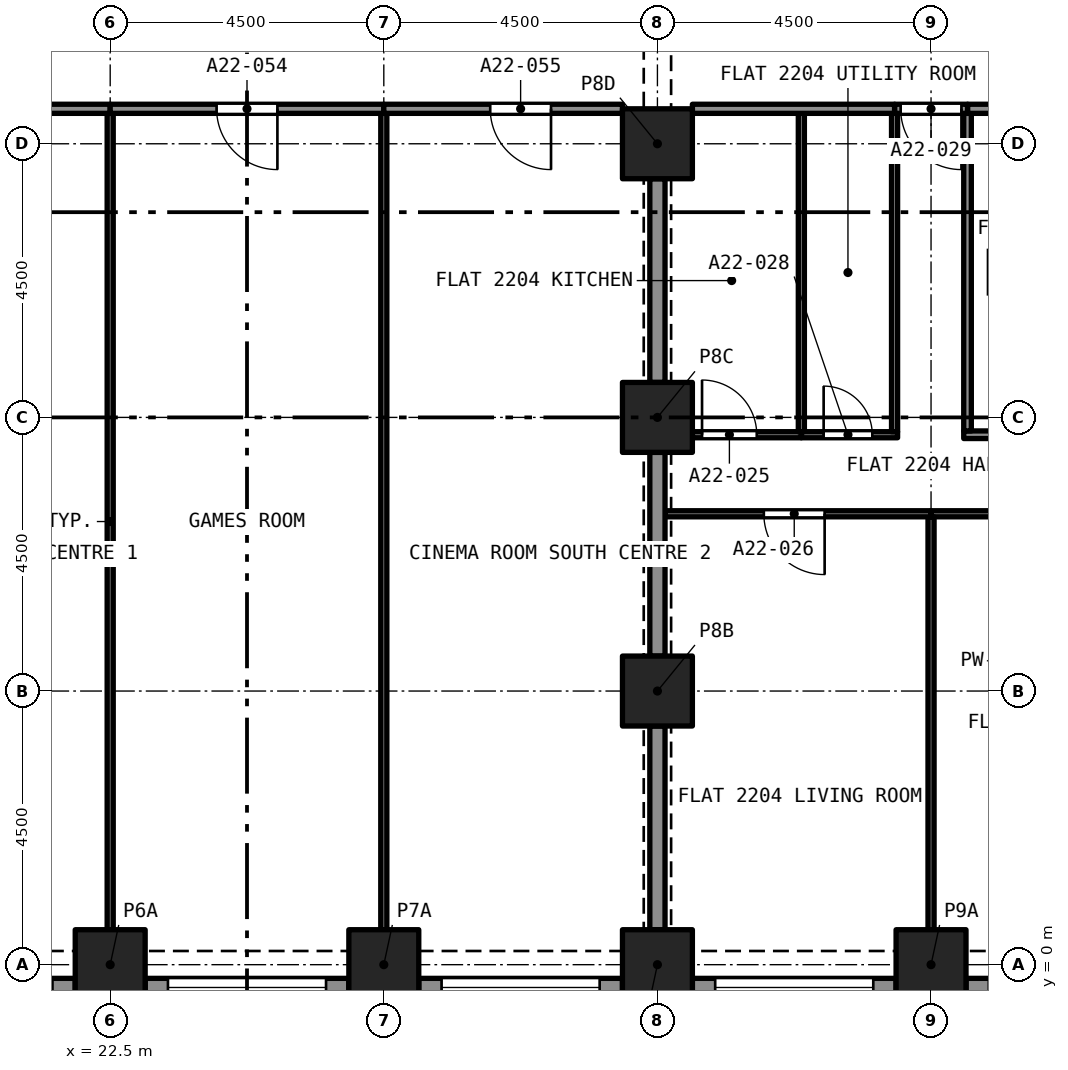
"""IFC4 building model, lengths in metres.
Left out: names, types, materials, properties, quantities, classifications, styles, units other than length and angle.
Written with IfcOpenShell. Run it as: python <this file> out.ifc"""

import sys

from ifc_helpers import new_model, si_unit, direction, frame, frame_2d, origin, origin_2d, place, context, subcontext, project, spatial, rectangle, extrude, element, fill, save


model = new_model("IFC4")
c1 = context("Model", 3, precision=1e-05, world=origin(), true_north=direction((0.0, 1.0)))
c2 = subcontext(c1, "Body", "Model", "MODEL_VIEW")
j1 = project(units=[si_unit("LENGTHUNIT", "METRE"), si_unit("PLANEANGLEUNIT", "RADIAN")], contexts=[c1])
p1 = place(None, origin())
s1 = spatial("IfcSite", under=j1, at=p1, CompositionType="ELEMENT")
p2 = place(p1, origin())
s2 = spatial("IfcBuilding", under=s1, at=p2, CompositionType="ELEMENT")
p3 = place(p2, frame((0.0, 0.0, 83.2)))
s3 = spatial("IfcBuildingStorey", under=s2, at=p3, CompositionType="ELEMENT", Elevation=83.2)
for number, where, z_axis, x_axis in (
    (1, (22.5, 0.0, 0.0), (0.0, 0.0, 1.0), (1.0, 0.0, 0.0)),
    (2, (27.0, 0.0, 0.0), (0.0, 0.0, 1.0), (1.0, 0.0, 0.0)),
    (3, (31.5, 0.0, 0.0), (0.0, 0.0, 1.0), (1.0, 0.0, 0.0)),
    (4, (36.0, 0.0, 0.0), (0.0, 0.0, 1.0), (1.0, 0.0, 0.0)),
    (5, (31.5, 4.5, 0.0), (0.0, 0.0, 1.0), (1.0, 0.0, 0.0)),
    (6, (31.5, 9.0, 0.0), (0.0, 0.0, 1.0), (1.0, 0.0, 0.0)),
    (7, (31.5, 13.5, 0.0), (0.0, 0.0, 1.0), (1.0, 0.0, 0.0)),
):
    element("IfcColumn", number, at=place(p3, frame(where, z_axis=z_axis, x_axis=x_axis)), inside=s3, PredefinedType="COLUMN", context=c2, shape_type="SweptSolid", body=[
        extrude(rectangle(XDim=1.15, YDim=1.15, at=origin_2d()), origin(), (0.0, 0.0, 1.0), 3.2),
    ])
p4 = place(p3, frame((21.925, -0.375, 0.0), z_axis=(0.0, 0.0, 1.0), x_axis=(-1.0, 0.0, 0.0)))
e8 = element("IfcWall", 8, at=p4, inside=s3, PredefinedType="SOLIDWALL", context=c2, shape_type="SweptSolid", body=[
    extrude(rectangle(XDim=3.35, YDim=0.3, at=frame_2d((1.675, 0.0))), origin(), (0.0, 0.0, 1.0), 3.2),
])
p5 = place(p4, frame((0.375, 0.0, 0.45)))
e9 = element("IfcOpeningElement", 9, at=p5, cuts=e8, PredefinedType="OPENING", context=c2, shape_type="SweptSolid", body=[
    extrude(rectangle(XDim=2.6, YDim=1.95, at=frame_2d((1.3, 0.975))), frame((0.0, 0.16, 0.0), z_axis=(0.0, -1.0, 0.0), x_axis=(1.0, 0.0, 0.0)), (0.0, 0.0, 1.0), 0.32),
])
p6 = place(p3, frame((26.425, -0.375, 0.0), z_axis=(0.0, 0.0, 1.0), x_axis=(-1.0, 0.0, 0.0)))
e10 = element("IfcWall", 10, at=p6, inside=s3, PredefinedType="SOLIDWALL", context=c2, shape_type="SweptSolid", body=[
    extrude(rectangle(XDim=3.35, YDim=0.3, at=frame_2d((1.675, 0.0))), origin(), (0.0, 0.0, 1.0), 3.2),
])
p7 = place(p6, frame((0.375, 0.0, 0.45)))
e11 = element("IfcOpeningElement", 11, at=p7, cuts=e10, PredefinedType="OPENING", context=c2, shape_type="SweptSolid", body=[
    extrude(rectangle(XDim=2.6, YDim=1.95, at=frame_2d((1.3, 0.975))), frame((0.0, 0.16, 0.0), z_axis=(0.0, -1.0, 0.0), x_axis=(1.0, 0.0, 0.0)), (0.0, 0.0, 1.0), 0.32),
])
p8 = place(p3, frame((30.925, -0.375, 0.0), z_axis=(0.0, 0.0, 1.0), x_axis=(-1.0, 0.0, 0.0)))
e12 = element("IfcWall", 12, at=p8, inside=s3, PredefinedType="SOLIDWALL", context=c2, shape_type="SweptSolid", body=[
    extrude(rectangle(XDim=3.35, YDim=0.3, at=frame_2d((1.675, 0.0))), origin(), (0.0, 0.0, 1.0), 3.2),
])
p9 = place(p8, frame((0.375, 0.0, 0.45)))
e13 = element("IfcOpeningElement", 13, at=p9, cuts=e12, PredefinedType="OPENING", context=c2, shape_type="SweptSolid", body=[
    extrude(rectangle(XDim=2.6, YDim=1.95, at=frame_2d((1.3, 0.975))), frame((0.0, 0.16, 0.0), z_axis=(0.0, -1.0, 0.0), x_axis=(1.0, 0.0, 0.0)), (0.0, 0.0, 1.0), 0.32),
])
p10 = place(p3, frame((35.425, -0.375, 0.0), z_axis=(0.0, 0.0, 1.0), x_axis=(-1.0, 0.0, 0.0)))
e14 = element("IfcWall", 14, at=p10, inside=s3, PredefinedType="SOLIDWALL", context=c2, shape_type="SweptSolid", body=[
    extrude(rectangle(XDim=3.35, YDim=0.3, at=frame_2d((1.675, 0.0))), origin(), (0.0, 0.0, 1.0), 3.2),
])
p11 = place(p10, frame((0.375, 0.0, 0.45)))
e15 = element("IfcOpeningElement", 15, at=p11, cuts=e14, PredefinedType="OPENING", context=c2, shape_type="SweptSolid", body=[
    extrude(rectangle(XDim=2.6, YDim=1.95, at=frame_2d((1.3, 0.975))), frame((0.0, 0.16, 0.0), z_axis=(0.0, -1.0, 0.0), x_axis=(1.0, 0.0, 0.0)), (0.0, 0.0, 1.0), 0.32),
])
p12 = place(p3, frame((39.925, -0.375, 0.0), z_axis=(0.0, 0.0, 1.0), x_axis=(-1.0, 0.0, 0.0)))
e16 = element("IfcWall", 16, at=p12, inside=s3, PredefinedType="SOLIDWALL", context=c2, shape_type="SweptSolid", body=[
    extrude(rectangle(XDim=3.35, YDim=0.3, at=frame_2d((1.675, 0.0))), origin(), (0.0, 0.0, 1.0), 3.2),
])
p13 = place(p12, frame((0.375, 0.0, 0.45)))
e17 = element("IfcOpeningElement", 17, at=p13, cuts=e16, PredefinedType="OPENING", context=c2, shape_type="SweptSolid", body=[
    extrude(rectangle(XDim=2.6, YDim=1.95, at=frame_2d((1.3, 0.975))), frame((0.0, 0.16, 0.0), z_axis=(0.0, -1.0, 0.0), x_axis=(1.0, 0.0, 0.0)), (0.0, 0.0, 1.0), 0.32),
])
p14 = place(p3, frame((36.538, 8.715, 0.0), z_axis=(0.0, 0.0, 1.0), x_axis=(1.0, 0.0, 0.0)))
e18 = element("IfcWall", 18, at=p14, inside=s3, PredefinedType="PARTITIONING", context=c2, shape_type="SweptSolid", body=[
    extrude(rectangle(XDim=2.414, YDim=0.125, at=frame_2d((1.207, 0.0))), origin(), (0.0, 0.0, 1.0), 2.9),
])
p15 = place(p14, frame((0.838, 0.0, 0.0)))
e19 = element("IfcOpeningElement", 19, at=p15, cuts=e18, PredefinedType="OPENING", context=c2, shape_type="SweptSolid", body=[
    extrude(rectangle(XDim=0.8, YDim=2.1, at=frame_2d((0.4, 1.05))), frame((0.0, 0.073, 0.0), z_axis=(0.0, -1.0, 0.0), x_axis=(1.0, 0.0, 0.0)), (0.0, 0.0, 1.0), 0.145),
])
p16 = place(p3, frame((36.6, 8.778, 0.0), z_axis=(0.0, 0.0, 1.0), x_axis=(0.0, 1.0, 0.0)))
e20 = element("IfcWall", 20, at=p16, inside=s3, PredefinedType="PARTITIONING", context=c2, shape_type="SweptSolid", body=[
    extrude(rectangle(XDim=5.222, YDim=0.125, at=frame_2d((2.611, 0.0))), origin(), (0.0, 0.0, 1.0), 2.9),
])
p17 = place(p3, frame((36.6, 14.075, 0.0), z_axis=(0.0, 0.0, 1.0), x_axis=(1.0, 0.0, 0.0)))
e21 = element("IfcWall", 21, at=p17, inside=s3, PredefinedType="PARTITIONING", context=c2, shape_type="SweptSolid", body=[
    extrude(rectangle(XDim=3.9, YDim=0.15, at=frame_2d((1.95, 0.0))), origin(), (0.0, 0.0, 1.0), 2.9),
])
p18 = place(p3, frame((40.4, 7.415, 0.0), z_axis=(0.0, 0.0, 1.0), x_axis=(-1.0, 0.0, 0.0)))
e22 = element("IfcWall", 22, at=p18, inside=s3, PredefinedType="PARTITIONING", context=c2, shape_type="SweptSolid", body=[
    extrude(rectangle(XDim=4.4, YDim=0.1, at=frame_2d((2.2, 0.0))), origin(), (0.0, 0.0, 1.0), 2.9),
])
p19 = place(p18, frame((1.7, 0.0, 0.0)))
e23 = element("IfcOpeningElement", 23, at=p19, cuts=e22, PredefinedType="OPENING", context=c2, shape_type="SweptSolid", body=[
    extrude(rectangle(XDim=0.9, YDim=2.1, at=frame_2d((0.45, 1.05))), frame((0.0, 0.06, 0.0), z_axis=(0.0, -1.0, 0.0), x_axis=(1.0, 0.0, 0.0)), (0.0, 0.0, 1.0), 0.12),
])
p20 = place(p3, frame((36.0, 0.575, 0.0), z_axis=(0.0, 0.0, 1.0), x_axis=(0.0, 1.0, 0.0)))
e24 = element("IfcWall", 24, at=p20, inside=s3, PredefinedType="PARTITIONING", context=c2, shape_type="SweptSolid", body=[
    extrude(rectangle(XDim=6.79, YDim=0.1, at=frame_2d((3.395, 0.0))), origin(), (0.0, 0.0, 1.0), 2.9),
])
p21 = place(p3, frame((32.075, 8.715, 0.0), z_axis=(0.0, 0.0, 1.0), x_axis=(1.0, 0.0, 0.0)))
e25 = element("IfcWall", 25, at=p21, inside=s3, PredefinedType="PARTITIONING", context=c2, shape_type="SweptSolid", body=[
    extrude(rectangle(XDim=1.792, YDim=0.1, at=frame_2d((0.896, 0.0))), origin(), (0.0, 0.0, 1.0), 2.9),
])
p22 = place(p21, frame((0.159, 0.0, 0.0)))
e26 = element("IfcOpeningElement", 26, at=p22, cuts=e25, PredefinedType="OPENING", context=c2, shape_type="SweptSolid", body=[
    extrude(rectangle(XDim=0.9, YDim=2.1, at=frame_2d((0.45, 1.05))), frame((0.0, 0.06, 0.0), z_axis=(0.0, -1.0, 0.0), x_axis=(1.0, 0.0, 0.0)), (0.0, 0.0, 1.0), 0.12),
])
p23 = place(p3, frame((36.0, 7.415, 0.0), z_axis=(0.0, 0.0, 1.0), x_axis=(-1.0, 0.0, 0.0)))
e27 = element("IfcWall", 27, at=p23, inside=s3, PredefinedType="PARTITIONING", context=c2, shape_type="SweptSolid", body=[
    extrude(rectangle(XDim=4.375, YDim=0.1, at=frame_2d((2.188, 0.0))), origin(), (0.0, 0.0, 1.0), 2.9),
])
p24 = place(p23, frame((1.75, 0.0, 0.0)))
e28 = element("IfcOpeningElement", 28, at=p24, cuts=e27, PredefinedType="OPENING", context=c2, shape_type="SweptSolid", body=[
    extrude(rectangle(XDim=1.0, YDim=2.1, at=frame_2d((0.5, 1.05))), frame((0.0, 0.06, 0.0), z_axis=(0.0, -1.0, 0.0), x_axis=(1.0, 0.0, 0.0)), (0.0, 0.0, 1.0), 0.12),
])
p25 = place(p3, frame((33.867, 8.715, 0.0), z_axis=(0.0, 0.0, 1.0), x_axis=(1.0, 0.0, 0.0)))
e29 = element("IfcWall", 29, at=p25, inside=s3, PredefinedType="PARTITIONING", context=c2, shape_type="SweptSolid", body=[
    extrude(rectangle(XDim=1.583, YDim=0.1, at=frame_2d((0.791, 0.0))), origin(), (0.0, 0.0, 1.0), 2.9),
])
p26 = place(p25, frame((0.366, 0.0, 0.0)))
e30 = element("IfcOpeningElement", 30, at=p26, cuts=e29, PredefinedType="OPENING", context=c2, shape_type="SweptSolid", body=[
    extrude(rectangle(XDim=0.8, YDim=2.1, at=frame_2d((0.4, 1.05))), frame((0.0, 0.06, 0.0), z_axis=(0.0, -1.0, 0.0), x_axis=(1.0, 0.0, 0.0)), (0.0, 0.0, 1.0), 0.12),
])
p27 = place(p3, frame((35.4, 8.765, 0.0), z_axis=(0.0, 0.0, 1.0), x_axis=(0.0, 1.0, 0.0)))
e31 = element("IfcWall", 31, at=p27, inside=s3, PredefinedType="PARTITIONING", context=c2, shape_type="SweptSolid", body=[
    extrude(rectangle(XDim=5.235, YDim=0.1, at=frame_2d((2.618, 0.0))), origin(), (0.0, 0.0, 1.0), 2.9),
])
p28 = place(p3, frame((36.6, 14.075, 0.0), z_axis=(0.0, 0.0, 1.0), x_axis=(-1.0, 0.0, 0.0)))
e32 = element("IfcWall", 32, at=p28, inside=s3, PredefinedType="PARTITIONING", context=c2, shape_type="SweptSolid", body=[
    extrude(rectangle(XDim=1.2, YDim=0.15, at=frame_2d((0.6, 0.0))), origin(), (0.0, 0.0, 1.0), 2.9),
])
p29 = place(p28, frame((0.1, 0.0, 0.0)))
e33 = element("IfcOpeningElement", 33, at=p29, cuts=e32, PredefinedType="OPENING", context=c2, shape_type="SweptSolid", body=[
    extrude(rectangle(XDim=1.0, YDim=2.1, at=frame_2d((0.5, 1.05))), frame((0.0, 0.085, 0.0), z_axis=(0.0, -1.0, 0.0), x_axis=(1.0, 0.0, 0.0)), (0.0, 0.0, 1.0), 0.17),
])
p30 = place(p3, frame((33.867, 8.765, 0.0), z_axis=(0.0, 0.0, 1.0), x_axis=(0.0, 1.0, 0.0)))
e34 = element("IfcWall", 34, at=p30, inside=s3, PredefinedType="PARTITIONING", context=c2, shape_type="SweptSolid", body=[
    extrude(rectangle(XDim=5.235, YDim=0.1, at=frame_2d((2.618, 0.0))), origin(), (0.0, 0.0, 1.0), 2.9),
])
p31 = place(p3, frame((31.5, 9.575, 0.0), z_axis=(0.0, 0.0, 1.0), x_axis=(0.0, 1.0, 0.0)))
e35 = element("IfcWall", 35, at=p31, inside=s3, PredefinedType="PARTITIONING", context=c2, shape_type="SweptSolid", body=[
    extrude(rectangle(XDim=3.35, YDim=0.25, at=frame_2d((1.675, 0.0))), origin(), (0.0, 0.0, 1.0), 2.38),
])
p32 = place(p3, frame((32.075, 14.075, 0.0), z_axis=(0.0, 0.0, 1.0), x_axis=(1.0, 0.0, 0.0)))
e36 = element("IfcWall", 36, at=p32, inside=s3, PredefinedType="PARTITIONING", context=c2, shape_type="SweptSolid", body=[
    extrude(rectangle(XDim=3.325, YDim=0.15, at=frame_2d((1.663, 0.0))), origin(), (0.0, 0.0, 1.0), 2.9),
])
for number, where, z_axis, x_axis in (
    (37, (31.5, 0.575, 0.0), (0.0, 0.0, 1.0), (0.0, 1.0, 0.0)),
    (38, (31.5, 5.075, 0.0), (0.0, 0.0, 1.0), (0.0, 1.0, 0.0)),
):
    element("IfcWall", number, at=place(p3, frame(where, z_axis=z_axis, x_axis=x_axis)), inside=s3, PredefinedType="PARTITIONING", context=c2, shape_type="SweptSolid", body=[
        extrude(rectangle(XDim=3.35, YDim=0.25, at=frame_2d((1.675, 0.0))), origin(), (0.0, 0.0, 1.0), 2.38),
    ])
p33 = place(p3, frame((22.5, 0.575, 0.0), z_axis=(0.0, 0.0, 1.0), x_axis=(0.0, 1.0, 0.0)))
e39 = element("IfcWall", 39, at=p33, inside=s3, PredefinedType="PARTITIONING", context=c2, shape_type="SweptSolid", body=[
    extrude(rectangle(XDim=13.425, YDim=0.1, at=frame_2d((6.712, 0.0))), origin(), (0.0, 0.0, 1.0), 2.75),
])
p34 = place(p3, frame((22.5, 14.075, 0.0), z_axis=(0.0, 0.0, 1.0), x_axis=(-1.0, 0.0, 0.0)))
e40 = element("IfcWall", 40, at=p34, inside=s3, PredefinedType="PARTITIONING", context=c2, shape_type="SweptSolid", body=[
    extrude(rectangle(XDim=3.925, YDim=0.15, at=frame_2d((1.962, 0.0))), origin(), (0.0, 0.0, 1.0), 2.75),
])
p35 = place(p34, frame((1.75, 0.0, 0.0)))
e41 = element("IfcOpeningElement", 41, at=p35, cuts=e40, PredefinedType="OPENING", context=c2, shape_type="SweptSolid", body=[
    extrude(rectangle(XDim=1.0, YDim=2.1, at=frame_2d((0.5, 1.05))), frame((0.0, 0.085, 0.0), z_axis=(0.0, -1.0, 0.0), x_axis=(1.0, 0.0, 0.0)), (0.0, 0.0, 1.0), 0.17),
])
p36 = place(p3, frame((27.0, 0.575, 0.0), z_axis=(0.0, 0.0, 1.0), x_axis=(0.0, 1.0, 0.0)))
e42 = element("IfcWall", 42, at=p36, inside=s3, PredefinedType="PARTITIONING", context=c2, shape_type="SweptSolid", body=[
    extrude(rectangle(XDim=13.425, YDim=0.1, at=frame_2d((6.712, 0.0))), origin(), (0.0, 0.0, 1.0), 2.75),
])
p37 = place(p3, frame((27.0, 14.075, 0.0), z_axis=(0.0, 0.0, 1.0), x_axis=(-1.0, 0.0, 0.0)))
e43 = element("IfcWall", 43, at=p37, inside=s3, PredefinedType="PARTITIONING", context=c2, shape_type="SweptSolid", body=[
    extrude(rectangle(XDim=4.5, YDim=0.15, at=frame_2d((2.25, 0.0))), origin(), (0.0, 0.0, 1.0), 2.75),
])
p38 = place(p37, frame((1.75, 0.0, 0.0)))
e44 = element("IfcOpeningElement", 44, at=p38, cuts=e43, PredefinedType="OPENING", context=c2, shape_type="SweptSolid", body=[
    extrude(rectangle(XDim=1.0, YDim=2.1, at=frame_2d((0.5, 1.05))), frame((0.0, 0.085, 0.0), z_axis=(0.0, -1.0, 0.0), x_axis=(1.0, 0.0, 0.0)), (0.0, 0.0, 1.0), 0.17),
])
p39 = place(p3, frame((30.925, 14.075, 0.0), z_axis=(0.0, 0.0, 1.0), x_axis=(-1.0, 0.0, 0.0)))
e45 = element("IfcWall", 45, at=p39, inside=s3, PredefinedType="PARTITIONING", context=c2, shape_type="SweptSolid", body=[
    extrude(rectangle(XDim=3.925, YDim=0.15, at=frame_2d((1.962, 0.0))), origin(), (0.0, 0.0, 1.0), 2.75),
])
p40 = place(p39, frame((1.175, 0.0, 0.0)))
e46 = element("IfcOpeningElement", 46, at=p40, cuts=e45, PredefinedType="OPENING", context=c2, shape_type="SweptSolid", body=[
    extrude(rectangle(XDim=1.0, YDim=2.1, at=frame_2d((0.5, 1.05))), frame((0.0, 0.085, 0.0), z_axis=(0.0, -1.0, 0.0), x_axis=(1.0, 0.0, 0.0)), (0.0, 0.0, 1.0), 0.17),
])
p41 = place(p7, origin())
e47 = element("IfcWindow", 47, at=p41, inside=s3, PartitioningType="SINGLE_PANEL", PredefinedType="WINDOW", context=c2, shape_type="SweptSolid", body=[
    extrude(rectangle(XDim=2.6, YDim=1.95, at=frame_2d((1.3, 0.975))), frame((0.0, 0.03, 0.0), z_axis=(0.0, -1.0, 0.0), x_axis=(1.0, 0.0, 0.0)), (0.0, 0.0, 1.0), 0.06),
])
fill(e11, e47)
p42 = place(p9, origin())
e48 = element("IfcWindow", 48, at=p42, inside=s3, PartitioningType="SINGLE_PANEL", PredefinedType="WINDOW", context=c2, shape_type="SweptSolid", body=[
    extrude(rectangle(XDim=2.6, YDim=1.95, at=frame_2d((1.3, 0.975))), frame((0.0, 0.03, 0.0), z_axis=(0.0, -1.0, 0.0), x_axis=(1.0, 0.0, 0.0)), (0.0, 0.0, 1.0), 0.06),
])
fill(e13, e48)
p43 = place(p11, origin())
e49 = element("IfcWindow", 49, at=p43, inside=s3, PartitioningType="SINGLE_PANEL", PredefinedType="WINDOW", context=c2, shape_type="SweptSolid", body=[
    extrude(rectangle(XDim=2.6, YDim=1.95, at=frame_2d((1.3, 0.975))), frame((0.0, 0.03, 0.0), z_axis=(0.0, -1.0, 0.0), x_axis=(1.0, 0.0, 0.0)), (0.0, 0.0, 1.0), 0.06),
])
fill(e15, e49)
p44 = place(p22, origin())
e50 = element("IfcDoor", 50, at=p44, inside=s3, OperationType="SINGLE_SWING_LEFT", PredefinedType="DOOR", context=c2, shape_type="SweptSolid", body=[
    extrude(rectangle(XDim=0.9, YDim=2.1, at=frame_2d((0.45, 1.05))), frame((0.0, 0.025, 0.0), z_axis=(0.0, -1.0, 0.0), x_axis=(1.0, 0.0, 0.0)), (0.0, 0.0, 1.0), 0.05),
])
fill(e26, e50)
p45 = place(p24, origin())
e51 = element("IfcDoor", 51, at=p45, inside=s3, OperationType="SINGLE_SWING_RIGHT", PredefinedType="DOOR", context=c2, shape_type="SweptSolid", body=[
    extrude(rectangle(XDim=1.0, YDim=2.1, at=frame_2d((0.5, 1.05))), frame((0.0, 0.025, 0.0), z_axis=(0.0, -1.0, 0.0), x_axis=(1.0, 0.0, 0.0)), (0.0, 0.0, 1.0), 0.05),
])
fill(e28, e51)
p46 = place(p26, origin())
e52 = element("IfcDoor", 52, at=p46, inside=s3, OperationType="SINGLE_SWING_LEFT", PredefinedType="DOOR", context=c2, shape_type="SweptSolid", body=[
    extrude(rectangle(XDim=0.8, YDim=2.1, at=frame_2d((0.4, 1.05))), frame((0.0, 0.025, 0.0), z_axis=(0.0, -1.0, 0.0), x_axis=(1.0, 0.0, 0.0)), (0.0, 0.0, 1.0), 0.05),
])
fill(e30, e52)
p47 = place(p29, origin())
e53 = element("IfcDoor", 53, at=p47, inside=s3, OperationType="SINGLE_SWING_RIGHT", PredefinedType="DOOR", context=c2, shape_type="SweptSolid", body=[
    extrude(rectangle(XDim=1.0, YDim=2.1, at=frame_2d((0.5, 1.05))), frame((0.0, 0.025, 0.0), z_axis=(0.0, -1.0, 0.0), x_axis=(1.0, 0.0, 0.0)), (0.0, 0.0, 1.0), 0.05),
])
fill(e33, e53)
p48 = place(p38, origin())
e54 = element("IfcDoor", 54, at=p48, inside=s3, OperationType="SINGLE_SWING_RIGHT", PredefinedType="DOOR", context=c2, shape_type="SweptSolid", body=[
    extrude(rectangle(XDim=1.0, YDim=2.1, at=frame_2d((0.5, 1.05))), frame((0.0, 0.025, 0.0), z_axis=(0.0, -1.0, 0.0), x_axis=(1.0, 0.0, 0.0)), (0.0, 0.0, 1.0), 0.05),
])
fill(e44, e54)
p49 = place(p40, origin())
e55 = element("IfcDoor", 55, at=p49, inside=s3, OperationType="SINGLE_SWING_LEFT", PredefinedType="DOOR", context=c2, shape_type="SweptSolid", body=[
    extrude(rectangle(XDim=1.0, YDim=2.1, at=frame_2d((0.5, 1.05))), frame((0.0, 0.025, 0.0), z_axis=(0.0, -1.0, 0.0), x_axis=(1.0, 0.0, 0.0)), (0.0, 0.0, 1.0), 0.05),
])
fill(e46, e55)
save(model, sys.argv[1])
